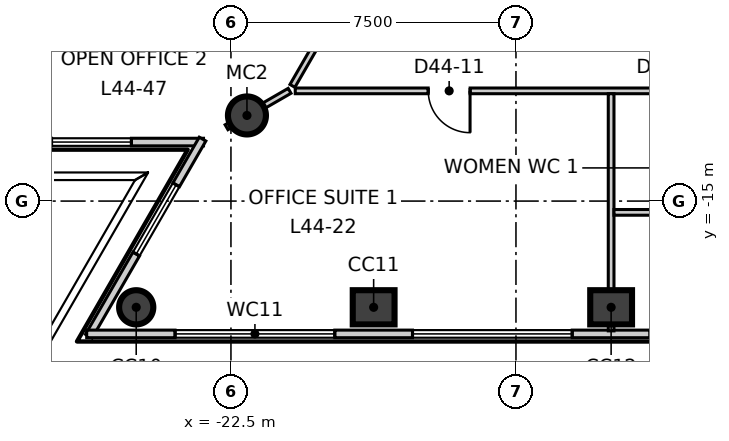
"""IFC4 building model, lengths in metres.
Left out: names, types, materials, properties, quantities, classifications, styles, units other than length and angle.
Written with IfcOpenShell. Run it as: python <this file> out.ifc"""

import sys

from ifc_helpers import new_model, si_unit, direction, frame, frame_2d, origin, origin_2d, place, context, subcontext, project, spatial, rectangle, circle, extrude, element, fill, save


model = new_model("IFC4")
c1 = context("Model", 3, precision=1e-05, world=origin(), true_north=direction((0.0, 1.0)))
c2 = subcontext(c1, "Body", "Model", "MODEL_VIEW")
j1 = project(units=[si_unit("LENGTHUNIT", "METRE"), si_unit("PLANEANGLEUNIT", "RADIAN")], contexts=[c1])
p1 = place(None, origin())
s1 = spatial("IfcSite", under=j1, at=p1, CompositionType="ELEMENT")
p2 = place(p1, origin())
s2 = spatial("IfcBuilding", under=s1, at=p2, CompositionType="ELEMENT")
p3 = place(p2, frame((0.0, 0.0, 191.3)))
s3 = spatial("IfcBuildingStorey", under=s2, at=p3, CompositionType="ELEMENT", Elevation=191.3)
p4 = place(p3, frame((-24.993, -17.795, -0.3), z_axis=(0.0, 0.0, 1.0), x_axis=(1.0, 0.0, 0.0)))
e1 = element("IfcColumn", 1, at=p4, inside=s3, PredefinedType="COLUMN", context=c2, shape_type="SweptSolid", body=[
    extrude(circle(Radius=0.45, at=origin_2d()), origin(), (0.0, 0.0, 1.0), 4.0),
])
for number, where, z_axis, x_axis in (
    (2, (-18.745, -17.795, -0.3), (0.0, 0.0, 1.0), (1.0, 0.0, 0.0)),
    (3, (-12.496, -17.795, -0.3), (0.0, 0.0, 1.0), (1.0, 0.0, 0.0)),
):
    element("IfcColumn", number, at=place(p3, frame(where, z_axis=z_axis, x_axis=x_axis)), inside=s3, PredefinedType="COLUMN", context=c2, shape_type="SweptSolid", body=[
        extrude(rectangle(XDim=1.1, YDim=0.9, at=origin_2d()), origin(), (0.0, 0.0, 1.0), 4.0),
    ])
p5 = place(p3, frame((-22.079, -12.747, -0.3), z_axis=(0.0, 0.0, 1.0), x_axis=(1.0, 0.0, 0.0)))
e4 = element("IfcColumn", 4, at=p5, inside=s3, PredefinedType="COLUMN", context=c2, shape_type="SweptSolid", body=[
    extrude(circle(Radius=0.5, at=origin_2d()), origin(), (0.0, 0.0, 1.0), 4.0),
])
p6 = place(p3, frame((-2.869, 32.02, 0.0), z_axis=(0.0, 0.0, 1.0), x_axis=(-0.500006930241, -0.866021402571, 0.0)))
e5 = element("IfcWall", 5, at=p6, inside=s3, PredefinedType="ELEMENTEDWALL", context=c2, shape_type="SweptSolid", body=[
    extrude(rectangle(XDim=52.572, YDim=0.2, at=frame_2d((26.286, 0.0))), origin(), (0.0, 0.0, 1.0), 3.7),
])
p7 = place(p6, frame((2.327, 0.0, 0.9)))
e6 = element("IfcOpeningElement", 6, at=p7, cuts=e5, PredefinedType="OPENING", context=c2, shape_type="SweptSolid", body=[
    extrude(rectangle(XDim=4.2, YDim=2.5, at=frame_2d((2.1, 1.25))), frame((0.0, 0.11, 0.0), z_axis=(0.0, -1.0, 0.0), x_axis=(1.0, 0.0, 0.0)), (0.0, 0.0, 1.0), 0.22),
])
p8 = place(p6, frame((8.575, 0.0, 0.9)))
e7 = element("IfcOpeningElement", 7, at=p8, cuts=e5, PredefinedType="OPENING", context=c2, shape_type="SweptSolid", body=[
    extrude(rectangle(XDim=4.2, YDim=2.5, at=frame_2d((2.1, 1.25))), frame((0.0, 0.11, 0.0), z_axis=(0.0, -1.0, 0.0), x_axis=(1.0, 0.0, 0.0)), (0.0, 0.0, 1.0), 0.22),
])
p9 = place(p6, frame((14.823, 0.0, 0.9)))
e8 = element("IfcOpeningElement", 8, at=p9, cuts=e5, PredefinedType="OPENING", context=c2, shape_type="SweptSolid", body=[
    extrude(rectangle(XDim=4.2, YDim=2.5, at=frame_2d((2.1, 1.25))), frame((0.0, 0.11, 0.0), z_axis=(0.0, -1.0, 0.0), x_axis=(1.0, 0.0, 0.0)), (0.0, 0.0, 1.0), 0.22),
])
p10 = place(p6, frame((21.071, 0.0, 0.9)))
e9 = element("IfcOpeningElement", 9, at=p10, cuts=e5, PredefinedType="OPENING", context=c2, shape_type="SweptSolid", body=[
    extrude(rectangle(XDim=4.2, YDim=2.5, at=frame_2d((2.1, 1.25))), frame((0.0, 0.11, 0.0), z_axis=(0.0, -1.0, 0.0), x_axis=(1.0, 0.0, 0.0)), (0.0, 0.0, 1.0), 0.22),
])
p11 = place(p6, frame((27.319, 0.0, 0.9)))
e10 = element("IfcOpeningElement", 10, at=p11, cuts=e5, PredefinedType="OPENING", context=c2, shape_type="SweptSolid", body=[
    extrude(rectangle(XDim=4.2, YDim=2.5, at=frame_2d((2.1, 1.25))), frame((0.0, 0.11, 0.0), z_axis=(0.0, -1.0, 0.0), x_axis=(1.0, 0.0, 0.0)), (0.0, 0.0, 1.0), 0.22),
])
p12 = place(p6, frame((33.568, 0.0, 0.9)))
e11 = element("IfcOpeningElement", 11, at=p12, cuts=e5, PredefinedType="OPENING", context=c2, shape_type="SweptSolid", body=[
    extrude(rectangle(XDim=4.2, YDim=2.5, at=frame_2d((2.1, 1.25))), frame((0.0, 0.11, 0.0), z_axis=(0.0, -1.0, 0.0), x_axis=(1.0, 0.0, 0.0)), (0.0, 0.0, 1.0), 0.22),
])
p13 = place(p6, frame((39.816, 0.0, 0.9)))
e12 = element("IfcOpeningElement", 12, at=p13, cuts=e5, PredefinedType="OPENING", context=c2, shape_type="SweptSolid", body=[
    extrude(rectangle(XDim=4.2, YDim=2.5, at=frame_2d((2.1, 1.25))), frame((0.0, 0.11, 0.0), z_axis=(0.0, -1.0, 0.0), x_axis=(1.0, 0.0, 0.0)), (0.0, 0.0, 1.0), 0.22),
])
p14 = place(p6, frame((46.064, 0.0, 0.9)))
e13 = element("IfcOpeningElement", 13, at=p14, cuts=e5, PredefinedType="OPENING", context=c2, shape_type="SweptSolid", body=[
    extrude(rectangle(XDim=4.2, YDim=2.5, at=frame_2d((2.1, 1.25))), frame((0.0, 0.11, 0.0), z_axis=(0.0, -1.0, 0.0), x_axis=(1.0, 0.0, 0.0)), (0.0, 0.0, 1.0), 0.22),
])
p15 = place(p3, frame((-29.21, -13.447, 0.0), z_axis=(0.0, 0.0, 1.0), x_axis=(1.0, 0.0, 0.0)))
e14 = element("IfcWall", 14, at=p15, inside=s3, PredefinedType="ELEMENTEDWALL", context=c2, shape_type="SweptSolid", body=[
    extrude(rectangle(XDim=5.988, YDim=0.2, at=frame_2d((2.994, 0.0))), origin(), (0.0, 0.0, 1.0), 3.7),
])
p16 = place(p15, frame((1.99, 0.0, 0.9)))
e15 = element("IfcOpeningElement", 15, at=p16, cuts=e14, PredefinedType="OPENING", context=c2, shape_type="SweptSolid", body=[
    extrude(rectangle(XDim=2.1, YDim=2.5, at=frame_2d((1.05, 1.25))), frame((0.0, 0.11, 0.0), z_axis=(0.0, -1.0, 0.0), x_axis=(1.0, 0.0, 0.0)), (0.0, 0.0, 1.0), 0.22),
])
p17 = place(p3, frame((-23.247, -13.369, 0.0), z_axis=(0.0, 0.0, 1.0), x_axis=(-0.499896541353, -0.866085127423, 0.0)))
e16 = element("IfcWall", 16, at=p17, inside=s3, PredefinedType="ELEMENTEDWALL", context=c2, shape_type="SweptSolid", body=[
    extrude(rectangle(XDim=5.989, YDim=0.2, at=frame_2d((2.995, 0.0))), origin(), (0.0, 0.0, 1.0), 3.7),
])
p18 = place(p17, frame((1.39, 0.0, 0.9)))
e17 = element("IfcOpeningElement", 17, at=p18, cuts=e16, PredefinedType="OPENING", context=c2, shape_type="SweptSolid", body=[
    extrude(rectangle(XDim=2.1, YDim=2.5, at=frame_2d((1.05, 1.25))), frame((0.0, 0.11, 0.0), z_axis=(0.0, -1.0, 0.0), x_axis=(1.0, 0.0, 0.0)), (0.0, 0.0, 1.0), 0.22),
])
p19 = place(p3, frame((-26.296, -18.495, 0.0), z_axis=(0.0, 0.0, 1.0), x_axis=(1.0, 0.0, 0.0)))
e18 = element("IfcWall", 18, at=p19, inside=s3, PredefinedType="ELEMENTEDWALL", context=c2, shape_type="SweptSolid", body=[
    extrude(rectangle(XDim=52.572, YDim=0.2, at=frame_2d((26.286, 0.0))), origin(), (0.0, 0.0, 1.0), 3.7),
])
p20 = place(p19, frame((2.327, 0.0, 0.9)))
e19 = element("IfcOpeningElement", 19, at=p20, cuts=e18, PredefinedType="OPENING", context=c2, shape_type="SweptSolid", body=[
    extrude(rectangle(XDim=4.2, YDim=2.5, at=frame_2d((2.1, 1.25))), frame((0.0, 0.11, 0.0), z_axis=(0.0, -1.0, 0.0), x_axis=(1.0, 0.0, 0.0)), (0.0, 0.0, 1.0), 0.22),
])
p21 = place(p19, frame((8.575, 0.0, 0.9)))
e20 = element("IfcOpeningElement", 20, at=p21, cuts=e18, PredefinedType="OPENING", context=c2, shape_type="SweptSolid", body=[
    extrude(rectangle(XDim=4.2, YDim=2.5, at=frame_2d((2.1, 1.25))), frame((0.0, 0.11, 0.0), z_axis=(0.0, -1.0, 0.0), x_axis=(1.0, 0.0, 0.0)), (0.0, 0.0, 1.0), 0.22),
])
p22 = place(p19, frame((14.824, 0.0, 0.9)))
e21 = element("IfcOpeningElement", 21, at=p22, cuts=e18, PredefinedType="OPENING", context=c2, shape_type="SweptSolid", body=[
    extrude(rectangle(XDim=4.2, YDim=2.5, at=frame_2d((2.1, 1.25))), frame((0.0, 0.11, 0.0), z_axis=(0.0, -1.0, 0.0), x_axis=(1.0, 0.0, 0.0)), (0.0, 0.0, 1.0), 0.22),
])
p23 = place(p19, frame((21.072, 0.0, 0.9)))
e22 = element("IfcOpeningElement", 22, at=p23, cuts=e18, PredefinedType="OPENING", context=c2, shape_type="SweptSolid", body=[
    extrude(rectangle(XDim=4.2, YDim=2.5, at=frame_2d((2.1, 1.25))), frame((0.0, 0.11, 0.0), z_axis=(0.0, -1.0, 0.0), x_axis=(1.0, 0.0, 0.0)), (0.0, 0.0, 1.0), 0.22),
])
p24 = place(p19, frame((27.32, 0.0, 0.9)))
e23 = element("IfcOpeningElement", 23, at=p24, cuts=e18, PredefinedType="OPENING", context=c2, shape_type="SweptSolid", body=[
    extrude(rectangle(XDim=4.2, YDim=2.5, at=frame_2d((2.1, 1.25))), frame((0.0, 0.11, 0.0), z_axis=(0.0, -1.0, 0.0), x_axis=(1.0, 0.0, 0.0)), (0.0, 0.0, 1.0), 0.22),
])
p25 = place(p19, frame((33.568, 0.0, 0.9)))
e24 = element("IfcOpeningElement", 24, at=p25, cuts=e18, PredefinedType="OPENING", context=c2, shape_type="SweptSolid", body=[
    extrude(rectangle(XDim=4.2, YDim=2.5, at=frame_2d((2.1, 1.25))), frame((0.0, 0.11, 0.0), z_axis=(0.0, -1.0, 0.0), x_axis=(1.0, 0.0, 0.0)), (0.0, 0.0, 1.0), 0.22),
])
p26 = place(p19, frame((39.817, 0.0, 0.9)))
e25 = element("IfcOpeningElement", 25, at=p26, cuts=e18, PredefinedType="OPENING", context=c2, shape_type="SweptSolid", body=[
    extrude(rectangle(XDim=4.2, YDim=2.5, at=frame_2d((2.1, 1.25))), frame((0.0, 0.11, 0.0), z_axis=(0.0, -1.0, 0.0), x_axis=(1.0, 0.0, 0.0)), (0.0, 0.0, 1.0), 0.22),
])
p27 = place(p19, frame((46.065, 0.0, 0.9)))
e26 = element("IfcOpeningElement", 26, at=p27, cuts=e18, PredefinedType="OPENING", context=c2, shape_type="SweptSolid", body=[
    extrude(rectangle(XDim=4.2, YDim=2.5, at=frame_2d((2.1, 1.25))), frame((0.0, 0.11, 0.0), z_axis=(0.0, -1.0, 0.0), x_axis=(1.0, 0.0, 0.0)), (0.0, 0.0, 1.0), 0.22),
])
p28 = place(p3, frame((-22.616, -13.057, 0.0), z_axis=(0.0, 0.0, 1.0), x_axis=(0.866030650962, 0.499990911512, 0.0)))
e27 = element("IfcWall", 27, at=p28, inside=s3, PredefinedType="PARTITIONING", context=c2, shape_type="SweptSolid", body=[
    extrude(rectangle(XDim=1.916, YDim=0.15, at=frame_2d((0.958, 0.0))), origin(), (0.0, 0.0, 1.0), 3.2),
])
p29 = place(p3, frame((-20.882, -11.969, 0.0), z_axis=(0.0, 0.0, 1.0), x_axis=(0.499998738735, 0.866026131975, 0.0)))
e28 = element("IfcWall", 28, at=p29, inside=s3, PredefinedType="PARTITIONING", context=c2, shape_type="SweptSolid", body=[
    extrude(rectangle(XDim=41.764, YDim=0.15, at=frame_2d((20.882, 0.0))), origin(), (0.0, 0.0, 1.0), 3.7),
])
p30 = place(p29, frame((37.014, 0.0, 0.0)))
e29 = element("IfcOpeningElement", 29, at=p30, cuts=e28, PredefinedType="OPENING", context=c2, shape_type="SweptSolid", body=[
    extrude(rectangle(XDim=1.0, YDim=2.1, at=frame_2d((0.5, 1.05))), frame((0.0, 0.085, 0.0), z_axis=(0.0, -1.0, 0.0), x_axis=(1.0, 0.0, 0.0)), (0.0, 0.0, 1.0), 0.17),
])
p31 = place(p29, frame((29.653, 0.0, 0.0)))
e30 = element("IfcOpeningElement", 30, at=p31, cuts=e28, PredefinedType="OPENING", context=c2, shape_type="SweptSolid", body=[
    extrude(rectangle(XDim=1.0, YDim=2.1, at=frame_2d((0.5, 1.05))), frame((0.0, 0.085, 0.0), z_axis=(0.0, -1.0, 0.0), x_axis=(1.0, 0.0, 0.0)), (0.0, 0.0, 1.0), 0.17),
])
p32 = place(p29, frame((23.405, 0.0, 0.0)))
e31 = element("IfcOpeningElement", 31, at=p32, cuts=e28, PredefinedType="OPENING", context=c2, shape_type="SweptSolid", body=[
    extrude(rectangle(XDim=1.0, YDim=2.1, at=frame_2d((0.5, 1.05))), frame((0.0, 0.085, 0.0), z_axis=(0.0, -1.0, 0.0), x_axis=(1.0, 0.0, 0.0)), (0.0, 0.0, 1.0), 0.17),
])
p33 = place(p29, frame((9.657, 0.0, 0.0)))
e32 = element("IfcOpeningElement", 32, at=p33, cuts=e28, PredefinedType="OPENING", context=c2, shape_type="SweptSolid", body=[
    extrude(rectangle(XDim=1.1, YDim=2.1, at=frame_2d((0.55, 1.05))), frame((0.0, 0.085, 0.0), z_axis=(0.0, -1.0, 0.0), x_axis=(1.0, 0.0, 0.0)), (0.0, 0.0, 1.0), 0.17),
])
p34 = place(p29, frame((18.757, 0.0, 0.0)))
e33 = element("IfcOpeningElement", 33, at=p34, cuts=e28, PredefinedType="OPENING", context=c2, shape_type="SweptSolid", body=[
    extrude(rectangle(XDim=0.9, YDim=2.1, at=frame_2d((0.45, 1.05))), frame((0.0, 0.085, 0.0), z_axis=(0.0, -1.0, 0.0), x_axis=(1.0, 0.0, 0.0)), (0.0, 0.0, 1.0), 0.17),
])
p35 = place(p29, frame((15.557, 0.0, 0.0)))
e34 = element("IfcOpeningElement", 34, at=p35, cuts=e28, PredefinedType="OPENING", context=c2, shape_type="SweptSolid", body=[
    extrude(rectangle(XDim=0.9, YDim=2.1, at=frame_2d((0.45, 1.05))), frame((0.0, 0.085, 0.0), z_axis=(0.0, -1.0, 0.0), x_axis=(1.0, 0.0, 0.0)), (0.0, 0.0, 1.0), 0.17),
])
p36 = place(p29, frame((12.657, 0.0, 0.0)))
e35 = element("IfcOpeningElement", 35, at=p36, cuts=e28, PredefinedType="OPENING", context=c2, shape_type="SweptSolid", body=[
    extrude(rectangle(XDim=1.0, YDim=2.1, at=frame_2d((0.5, 1.05))), frame((0.0, 0.085, 0.0), z_axis=(0.0, -1.0, 0.0), x_axis=(1.0, 0.0, 0.0)), (0.0, 0.0, 1.0), 0.17),
])
p37 = place(p29, frame((3.56, 0.0, 0.0)))
e36 = element("IfcOpeningElement", 36, at=p37, cuts=e28, PredefinedType="OPENING", context=c2, shape_type="SweptSolid", body=[
    extrude(rectangle(XDim=1.1, YDim=2.1, at=frame_2d((0.55, 1.05))), frame((0.0, 0.085, 0.0), z_axis=(0.0, -1.0, 0.0), x_axis=(1.0, 0.0, 0.0)), (0.0, 0.0, 1.0), 0.17),
])
p38 = place(p3, frame((-20.808, -12.1, 0.0), z_axis=(0.0, 0.0, 1.0), x_axis=(1.0, 0.0, 0.0)))
e37 = element("IfcWall", 37, at=p38, inside=s3, PredefinedType="PARTITIONING", context=c2, shape_type="SweptSolid", body=[
    extrude(rectangle(XDim=41.766, YDim=0.15, at=frame_2d((20.883, 0.0))), origin(), (0.0, 0.0, 1.0), 3.7),
])
p39 = place(p38, frame((3.5, 0.0, 0.0)))
e38 = element("IfcOpeningElement", 38, at=p39, cuts=e37, PredefinedType="OPENING", context=c2, shape_type="SweptSolid", body=[
    extrude(rectangle(XDim=1.1, YDim=2.1, at=frame_2d((0.55, 1.05))), frame((0.0, 0.085, 0.0), z_axis=(0.0, -1.0, 0.0), x_axis=(1.0, 0.0, 0.0)), (0.0, 0.0, 1.0), 0.17),
])
p40 = place(p38, frame((18.362, 0.0, 0.0)))
e39 = element("IfcOpeningElement", 39, at=p40, cuts=e37, PredefinedType="OPENING", context=c2, shape_type="SweptSolid", body=[
    extrude(rectangle(XDim=1.1, YDim=2.1, at=frame_2d((0.55, 1.05))), frame((0.0, 0.085, 0.0), z_axis=(0.0, -1.0, 0.0), x_axis=(1.0, 0.0, 0.0)), (0.0, 0.0, 1.0), 0.17),
])
p41 = place(p38, frame((9.462, 0.0, 0.0)))
e40 = element("IfcOpeningElement", 40, at=p41, cuts=e37, PredefinedType="OPENING", context=c2, shape_type="SweptSolid", body=[
    extrude(rectangle(XDim=0.9, YDim=2.1, at=frame_2d((0.45, 1.05))), frame((0.0, 0.085, 0.0), z_axis=(0.0, -1.0, 0.0), x_axis=(1.0, 0.0, 0.0)), (0.0, 0.0, 1.0), 0.17),
])
p42 = place(p38, frame((12.662, 0.0, 0.0)))
e41 = element("IfcOpeningElement", 41, at=p42, cuts=e37, PredefinedType="OPENING", context=c2, shape_type="SweptSolid", body=[
    extrude(rectangle(XDim=0.9, YDim=2.1, at=frame_2d((0.45, 1.05))), frame((0.0, 0.085, 0.0), z_axis=(0.0, -1.0, 0.0), x_axis=(1.0, 0.0, 0.0)), (0.0, 0.0, 1.0), 0.17),
])
p43 = place(p38, frame((15.362, 0.0, 0.0)))
e42 = element("IfcOpeningElement", 42, at=p43, cuts=e37, PredefinedType="OPENING", context=c2, shape_type="SweptSolid", body=[
    extrude(rectangle(XDim=1.0, YDim=2.1, at=frame_2d((0.5, 1.05))), frame((0.0, 0.085, 0.0), z_axis=(0.0, -1.0, 0.0), x_axis=(1.0, 0.0, 0.0)), (0.0, 0.0, 1.0), 0.17),
])
p44 = place(p38, frame((26.458, 0.0, 0.0)))
e43 = element("IfcOpeningElement", 43, at=p44, cuts=e37, PredefinedType="OPENING", context=c2, shape_type="SweptSolid", body=[
    extrude(rectangle(XDim=1.1, YDim=2.1, at=frame_2d((0.55, 1.05))), frame((0.0, 0.085, 0.0), z_axis=(0.0, -1.0, 0.0), x_axis=(1.0, 0.0, 0.0)), (0.0, 0.0, 1.0), 0.17),
])
p45 = place(p38, frame((36.955, 0.0, 0.0)))
e44 = element("IfcOpeningElement", 44, at=p45, cuts=e37, PredefinedType="OPENING", context=c2, shape_type="SweptSolid", body=[
    extrude(rectangle(XDim=1.1, YDim=2.1, at=frame_2d((0.55, 1.05))), frame((0.0, 0.085, 0.0), z_axis=(0.0, -1.0, 0.0), x_axis=(1.0, 0.0, 0.0)), (0.0, 0.0, 1.0), 0.17),
])
p46 = place(p3, frame((-12.496, -18.415, 0.0), z_axis=(0.0, 0.0, 1.0), x_axis=(0.0, 1.0, 0.0)))
e45 = element("IfcWall", 45, at=p46, inside=s3, PredefinedType="PARTITIONING", context=c2, shape_type="SweptSolid", body=[
    extrude(rectangle(XDim=6.24, YDim=0.15, at=frame_2d((3.12, 0.0))), origin(), (0.0, 0.0, 1.0), 3.7),
])
p47 = place(p3, frame((-12.421, -15.297, 0.0), z_axis=(0.0, 0.0, 1.0), x_axis=(1.0, 0.0, 0.0)))
e46 = element("IfcWall", 46, at=p47, inside=s3, PredefinedType="PARTITIONING", context=c2, shape_type="SweptSolid", body=[
    extrude(rectangle(XDim=8.725, YDim=0.15, at=frame_2d((4.362, 0.0))), origin(), (0.0, 0.0, 1.0), 3.7),
])
p48 = place(p14, origin())
e47 = element("IfcWindow", 47, at=p48, inside=s3, PartitioningType="SINGLE_PANEL", PredefinedType="WINDOW", context=c2, shape_type="SweptSolid", body=[
    extrude(rectangle(XDim=4.2, YDim=2.5, at=frame_2d((2.1, 1.25))), frame((0.0, 0.03, 0.0), z_axis=(0.0, -1.0, 0.0), x_axis=(1.0, 0.0, 0.0)), (0.0, 0.0, 1.0), 0.06),
])
fill(e13, e47)
p49 = place(p16, origin())
e48 = element("IfcWindow", 48, at=p49, inside=s3, PartitioningType="SINGLE_PANEL", PredefinedType="WINDOW", context=c2, shape_type="SweptSolid", body=[
    extrude(rectangle(XDim=2.1, YDim=2.5, at=frame_2d((1.05, 1.25))), frame((0.0, 0.03, 0.0), z_axis=(0.0, -1.0, 0.0), x_axis=(1.0, 0.0, 0.0)), (0.0, 0.0, 1.0), 0.06),
])
fill(e15, e48)
p50 = place(p18, origin())
e49 = element("IfcWindow", 49, at=p50, inside=s3, PartitioningType="SINGLE_PANEL", PredefinedType="WINDOW", context=c2, shape_type="SweptSolid", body=[
    extrude(rectangle(XDim=2.1, YDim=2.5, at=frame_2d((1.05, 1.25))), frame((0.0, 0.03, 0.0), z_axis=(0.0, -1.0, 0.0), x_axis=(1.0, 0.0, 0.0)), (0.0, 0.0, 1.0), 0.06),
])
fill(e17, e49)
p51 = place(p20, origin())
e50 = element("IfcWindow", 50, at=p51, inside=s3, PartitioningType="SINGLE_PANEL", PredefinedType="WINDOW", context=c2, shape_type="SweptSolid", body=[
    extrude(rectangle(XDim=4.2, YDim=2.5, at=frame_2d((2.1, 1.25))), frame((0.0, 0.03, 0.0), z_axis=(0.0, -1.0, 0.0), x_axis=(1.0, 0.0, 0.0)), (0.0, 0.0, 1.0), 0.06),
])
fill(e19, e50)
p52 = place(p21, origin())
e51 = element("IfcWindow", 51, at=p52, inside=s3, PartitioningType="SINGLE_PANEL", PredefinedType="WINDOW", context=c2, shape_type="SweptSolid", body=[
    extrude(rectangle(XDim=4.2, YDim=2.5, at=frame_2d((2.1, 1.25))), frame((0.0, 0.03, 0.0), z_axis=(0.0, -1.0, 0.0), x_axis=(1.0, 0.0, 0.0)), (0.0, 0.0, 1.0), 0.06),
])
fill(e20, e51)
p53 = place(p39, origin())
e52 = element("IfcDoor", 52, at=p53, inside=s3, OperationType="SINGLE_SWING_RIGHT", PredefinedType="DOOR", context=c2, shape_type="SweptSolid", body=[
    extrude(rectangle(XDim=1.1, YDim=2.1, at=frame_2d((0.55, 1.05))), frame((0.0, 0.025, 0.0), z_axis=(0.0, -1.0, 0.0), x_axis=(1.0, 0.0, 0.0)), (0.0, 0.0, 1.0), 0.05),
])
fill(e38, e52)
save(model, sys.argv[1])
